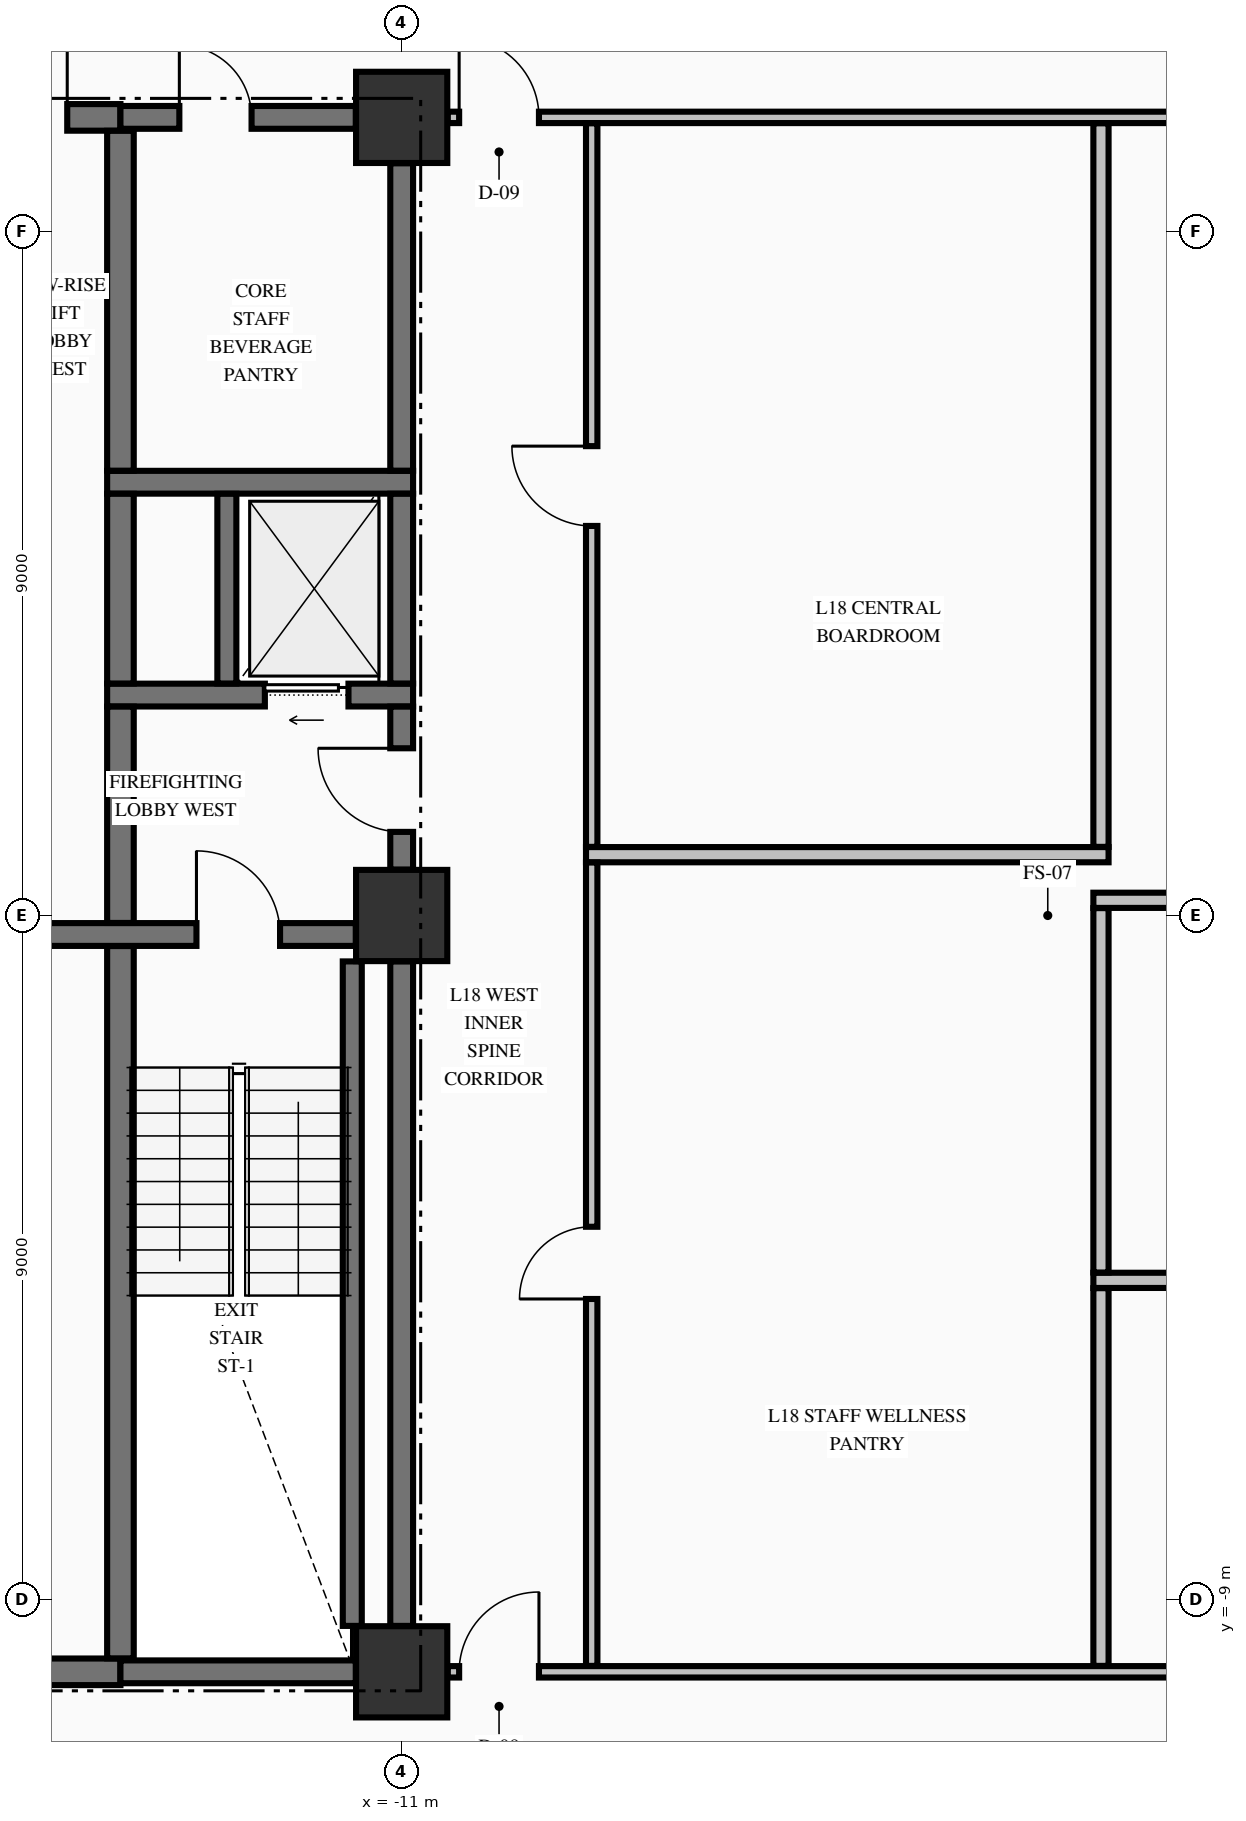
"""IFC4 building model, lengths in metres.
Left out: names, types, materials, properties, quantities, classifications, styles, units other than length and angle.
Written with IfcOpenShell. Run it as: python <this file> out.ifc"""

import sys

from ifc_helpers import new_model, si_unit, direction, frame, frame_2d, origin, origin_2d, place, context, subcontext, project, spatial, rectangle, extrude, element, fill, save


model = new_model("IFC4")
c1 = context("Model", 3, precision=1e-05, world=origin(), true_north=direction((0.0, 1.0)))
c2 = subcontext(c1, "Body", "Model", "MODEL_VIEW")
j1 = project(units=[si_unit("LENGTHUNIT", "METRE"), si_unit("PLANEANGLEUNIT", "RADIAN")], contexts=[c1])
p1 = place(None, origin())
s1 = spatial("IfcSite", under=j1, at=p1, CompositionType="ELEMENT")
p2 = place(p1, origin())
s2 = spatial("IfcBuilding", under=s1, at=p2, CompositionType="ELEMENT")
p3 = place(p2, frame((0.0, 0.0, 75.04)))
s3 = spatial("IfcBuildingStorey", under=s2, at=p3, CompositionType="ELEMENT", Elevation=75.04)
for number, where, z_axis, x_axis in (
    (1, (-11.0, -9.95, -0.25), (0.0, 0.0, 1.0), (1.0, 0.0, 0.0)),
    (2, (-11.0, 0.0, -0.25), (0.0, 0.0, 1.0), (1.0, 0.0, 0.0)),
    (3, (-11.0, 10.5, -0.25), (0.0, 0.0, 1.0), (1.0, 0.0, 0.0)),
):
    element("IfcColumn", number, at=place(p3, frame(where, z_axis=z_axis, x_axis=x_axis)), inside=s3, PredefinedType="COLUMN", context=c2, shape_type="SweptSolid", body=[
        extrude(rectangle(XDim=1.2, YDim=1.2, at=origin_2d()), origin(), (0.0, 0.0, 1.0), 3.57),
    ])
p4 = place(p3, frame((-19.396, -9.95, 0.0), z_axis=(0.0, 0.0, 1.0), x_axis=(1.0, 0.0, 0.0)))
e4 = element("IfcWall", 4, at=p4, inside=s3, PredefinedType="SHEAR", context=c2, shape_type="SweptSolid", body=[
    extrude(rectangle(XDim=4.696, YDim=0.35, at=frame_2d((2.348, 0.0))), origin(), (0.0, 0.0, 1.0), 3.32),
])
p5 = place(p4, frame((0.571, 0.0, 0.0)))
e5 = element("IfcOpeningElement", 5, at=p5, cuts=e4, PredefinedType="OPENING", context=c2, shape_type="SweptSolid", body=[
    extrude(rectangle(XDim=1.05, YDim=2.15, at=frame_2d((0.525, 1.075))), frame((0.0, 0.185, 0.0), z_axis=(0.0, -1.0, 0.0), x_axis=(1.0, 0.0, 0.0)), (0.0, 0.0, 1.0), 0.37),
])
p6 = place(p3, frame((-14.7, -9.95, 0.0), z_axis=(0.0, 0.0, 1.0), x_axis=(1.0, 0.0, 0.0)))
e6 = element("IfcWall", 6, at=p6, inside=s3, PredefinedType="SHEAR", context=c2, shape_type="SweptSolid", body=[
    extrude(rectangle(XDim=3.096, YDim=0.3, at=frame_2d((1.548, 0.0))), origin(), (0.0, 0.0, 1.0), 3.32),
])
p7 = place(p3, frame((-19.396, -0.25, 0.0), z_axis=(0.0, 0.0, 1.0), x_axis=(1.0, 0.0, 0.0)))
e7 = element("IfcWall", 7, at=p7, inside=s3, PredefinedType="SHEAR", context=c2, shape_type="SweptSolid", body=[
    extrude(rectangle(XDim=7.792, YDim=0.3, at=frame_2d((3.896, 0.0))), origin(), (0.0, 0.0, 1.0), 3.32),
])
p8 = place(p7, frame((5.696, 0.0, 0.0)))
e8 = element("IfcOpeningElement", 8, at=p8, cuts=e7, PredefinedType="OPENING", context=c2, shape_type="SweptSolid", body=[
    extrude(rectangle(XDim=1.1, YDim=2.15, at=frame_2d((0.55, 1.075))), frame((0.0, 0.16, 0.0), z_axis=(0.0, -1.0, 0.0), x_axis=(1.0, 0.0, 0.0)), (0.0, 0.0, 1.0), 0.32),
])
p9 = place(p3, frame((-14.875, 2.9, 0.0), z_axis=(0.0, 0.0, 1.0), x_axis=(1.0, 0.0, 0.0)))
e9 = element("IfcWall", 9, at=p9, inside=s3, PredefinedType="SHEAR", context=c2, shape_type="SweptSolid", body=[
    extrude(rectangle(XDim=4.025, YDim=0.3, at=frame_2d((2.012, 0.0))), origin(), (0.0, 0.0, 1.0), 3.32),
])
p10 = place(p9, frame((2.075, 0.0, 0.0)))
e10 = element("IfcOpeningElement", 10, at=p10, cuts=e9, PredefinedType="OPENING", context=c2, shape_type="SweptSolid", body=[
    extrude(rectangle(XDim=1.1, YDim=2.2, at=frame_2d((0.55, 1.1))), frame((0.0, 0.16, 0.0), z_axis=(0.0, -1.0, 0.0), x_axis=(1.0, 0.0, 0.0)), (0.0, 0.0, 1.0), 0.32),
])
p11 = place(p3, frame((-14.875, 5.7, 0.0), z_axis=(0.0, 0.0, 1.0), x_axis=(1.0, 0.0, 0.0)))
e11 = element("IfcWall", 11, at=p11, inside=s3, PredefinedType="SHEAR", context=c2, shape_type="SweptSolid", body=[
    extrude(rectangle(XDim=4.025, YDim=0.3, at=frame_2d((2.012, 0.0))), origin(), (0.0, 0.0, 1.0), 3.32),
])
p12 = place(p3, frame((-19.396, 10.5, 0.0), z_axis=(0.0, 0.0, 1.0), x_axis=(1.0, 0.0, 0.0)))
e12 = element("IfcWall", 12, at=p12, inside=s3, PredefinedType="SHEAR", context=c2, shape_type="SweptSolid", body=[
    extrude(rectangle(XDim=4.696, YDim=0.35, at=frame_2d((2.348, 0.0))), origin(), (0.0, 0.0, 1.0), 3.32),
])
p13 = place(p12, frame((2.796, 0.0, 0.0)))
e13 = element("IfcOpeningElement", 13, at=p13, cuts=e12, PredefinedType="OPENING", context=c2, shape_type="SweptSolid", body=[
    extrude(rectangle(XDim=1.2, YDim=2.15, at=frame_2d((0.6, 1.075))), frame((0.0, 0.185, 0.0), z_axis=(0.0, -1.0, 0.0), x_axis=(1.0, 0.0, 0.0)), (0.0, 0.0, 1.0), 0.37),
])
p14 = place(p3, frame((-14.7, 10.5, 0.0), z_axis=(0.0, 0.0, 1.0), x_axis=(1.0, 0.0, 0.0)))
e14 = element("IfcWall", 14, at=p14, inside=s3, PredefinedType="SHEAR", context=c2, shape_type="SweptSolid", body=[
    extrude(rectangle(XDim=3.096, YDim=0.3, at=frame_2d((1.548, 0.0))), origin(), (0.0, 0.0, 1.0), 3.32),
])
p15 = place(p14, frame((0.775, 0.0, 0.0)))
e15 = element("IfcOpeningElement", 15, at=p15, cuts=e14, PredefinedType="OPENING", context=c2, shape_type="SweptSolid", body=[
    extrude(rectangle(XDim=0.95, YDim=2.15, at=frame_2d((0.475, 1.075))), frame((0.0, 0.16, 0.0), z_axis=(0.0, -1.0, 0.0), x_axis=(1.0, 0.0, 0.0)), (0.0, 0.0, 1.0), 0.32),
])
p16 = place(p3, frame((-10.394, -9.95, 0.0), z_axis=(0.0, 0.0, 1.0), x_axis=(1.0, 0.0, 0.0)))
e16 = element("IfcWall", 16, at=p16, inside=s3, PredefinedType="PARTITIONING", context=c2, shape_type="SweptSolid", body=[
    extrude(rectangle(XDim=20.788, YDim=0.15, at=frame_2d((10.394, 0.0))), origin(), (0.0, 0.0, 1.0), 3.32),
])
p17 = place(p16, frame((0.15, 0.0, 0.0)))
e17 = element("IfcOpeningElement", 17, at=p17, cuts=e16, PredefinedType="OPENING", context=c2, shape_type="SweptSolid", body=[
    extrude(rectangle(XDim=1.05, YDim=2.15, at=frame_2d((0.525, 1.075))), frame((0.0, 0.085, 0.0), z_axis=(0.0, -1.0, 0.0), x_axis=(1.0, 0.0, 0.0)), (0.0, 0.0, 1.0), 0.17),
])
p18 = place(p16, frame((19.588, 0.0, 0.0)))
e18 = element("IfcOpeningElement", 18, at=p18, cuts=e16, PredefinedType="OPENING", context=c2, shape_type="SweptSolid", body=[
    extrude(rectangle(XDim=1.05, YDim=2.15, at=frame_2d((0.525, 1.075))), frame((0.0, 0.085, 0.0), z_axis=(0.0, -1.0, 0.0), x_axis=(1.0, 0.0, 0.0)), (0.0, 0.0, 1.0), 0.17),
])
p19 = place(p16, frame((11.769, 0.0, 0.0)))
e19 = element("IfcOpeningElement", 19, at=p19, cuts=e16, PredefinedType="OPENING", context=c2, shape_type="SweptSolid", body=[
    extrude(rectangle(XDim=0.95, YDim=2.15, at=frame_2d((0.475, 1.075))), frame((0.0, 0.085, 0.0), z_axis=(0.0, -1.0, 0.0), x_axis=(1.0, 0.0, 0.0)), (0.0, 0.0, 1.0), 0.17),
])
for number, where, z_axis, x_axis in (
    (20, (-1.9, -4.8, 0.0), (0.0, 0.0, 1.0), (1.0, 0.0, 0.0)),
    (21, (-1.9, 0.2, 0.0), (0.0, 0.0, 1.0), (1.0, 0.0, 0.0)),
):
    element("IfcWall", number, at=place(p3, frame(where, z_axis=z_axis, x_axis=x_axis)), inside=s3, PredefinedType="PARTITIONING", context=c2, shape_type="SweptSolid", body=[
        extrude(rectangle(XDim=10.475, YDim=0.2, at=frame_2d((5.237, 0.0))), origin(), (0.0, 0.0, 1.0), 3.32),
    ])
p20 = place(p3, frame((-8.575, 0.8, 0.0), z_axis=(0.0, 0.0, 1.0), x_axis=(1.0, 0.0, 0.0)))
e22 = element("IfcWall", 22, at=p20, inside=s3, PredefinedType="PARTITIONING", context=c2, shape_type="SweptSolid", body=[
    extrude(rectangle(XDim=6.875, YDim=0.2, at=frame_2d((3.438, 0.0))), origin(), (0.0, 0.0, 1.0), 3.32),
])
p21 = place(p3, frame((-10.394, 10.5, 0.0), z_axis=(0.0, 0.0, 1.0), x_axis=(1.0, 0.0, 0.0)))
e23 = element("IfcWall", 23, at=p21, inside=s3, PredefinedType="PARTITIONING", context=c2, shape_type="SweptSolid", body=[
    extrude(rectangle(XDim=20.788, YDim=0.15, at=frame_2d((10.394, 0.0))), origin(), (0.0, 0.0, 1.0), 3.32),
])
p22 = place(p21, frame((0.15, 0.0, 0.0)))
e24 = element("IfcOpeningElement", 24, at=p22, cuts=e23, PredefinedType="OPENING", context=c2, shape_type="SweptSolid", body=[
    extrude(rectangle(XDim=1.05, YDim=2.15, at=frame_2d((0.525, 1.075))), frame((0.0, 0.085, 0.0), z_axis=(0.0, -1.0, 0.0), x_axis=(1.0, 0.0, 0.0)), (0.0, 0.0, 1.0), 0.17),
])
p23 = place(p21, frame((19.588, 0.0, 0.0)))
e25 = element("IfcOpeningElement", 25, at=p23, cuts=e23, PredefinedType="OPENING", context=c2, shape_type="SweptSolid", body=[
    extrude(rectangle(XDim=1.05, YDim=2.15, at=frame_2d((0.525, 1.075))), frame((0.0, 0.085, 0.0), z_axis=(0.0, -1.0, 0.0), x_axis=(1.0, 0.0, 0.0)), (0.0, 0.0, 1.0), 0.17),
])
p24 = place(p3, frame((-14.7, -9.773, 0.0), z_axis=(0.0, 0.0, 1.0), x_axis=(0.0, 1.0, 0.0)))
e26 = element("IfcWall", 26, at=p24, inside=s3, PredefinedType="SHEAR", context=c2, shape_type="SweptSolid", body=[
    extrude(rectangle(XDim=9.371, YDim=0.35, at=frame_2d((4.686, 0.0))), origin(), (0.0, 0.0, 1.0), 3.32),
])
p25 = place(p3, frame((-14.7, -0.098, 0.0), z_axis=(0.0, 0.0, 1.0), x_axis=(0.0, 1.0, 0.0)))
e27 = element("IfcWall", 27, at=p25, inside=s3, PredefinedType="SHEAR", context=c2, shape_type="SweptSolid", body=[
    extrude(rectangle(XDim=2.846, YDim=0.35, at=frame_2d((1.423, 0.0))), origin(), (0.0, 0.0, 1.0), 3.32),
])
p26 = place(p3, frame((-14.7, 3.052, 0.0), z_axis=(0.0, 0.0, 1.0), x_axis=(0.0, 1.0, 0.0)))
e28 = element("IfcWall", 28, at=p26, inside=s3, PredefinedType="SHEAR", context=c2, shape_type="SweptSolid", body=[
    extrude(rectangle(XDim=2.496, YDim=0.35, at=frame_2d((1.248, 0.0))), origin(), (0.0, 0.0, 1.0), 3.32),
])
p27 = place(p3, frame((-14.7, 5.852, 0.0), z_axis=(0.0, 0.0, 1.0), x_axis=(0.0, 1.0, 0.0)))
e29 = element("IfcWall", 29, at=p27, inside=s3, PredefinedType="SHEAR", context=c2, shape_type="SweptSolid", body=[
    extrude(rectangle(XDim=4.471, YDim=0.35, at=frame_2d((2.235, 0.0))), origin(), (0.0, 0.0, 1.0), 3.32),
])
p28 = place(p3, frame((-13.3, 3.052, 0.0), z_axis=(0.0, 0.0, 1.0), x_axis=(0.0, 1.0, 0.0)))
e30 = element("IfcWall", 30, at=p28, inside=s3, PredefinedType="SOLIDWALL", context=c2, shape_type="SweptSolid", body=[
    extrude(rectangle(XDim=2.496, YDim=0.25, at=frame_2d((1.248, 0.0))), origin(), (0.0, 0.0, 1.0), 3.32),
])
p29 = place(p3, frame((-11.65, -9.346, 0.0), z_axis=(0.0, 0.0, 1.0), x_axis=(0.0, 1.0, 0.0)))
e31 = element("IfcWall", 31, at=p29, inside=s3, PredefinedType="SOLIDWALL", context=c2, shape_type="SweptSolid", body=[
    extrude(rectangle(XDim=8.742, YDim=0.25, at=frame_2d((4.371, 0.0))), origin(), (0.0, 0.0, 1.0), 3.32),
])
p30 = place(p3, frame((-11.0, -9.346, 0.0), z_axis=(0.0, 0.0, 1.0), x_axis=(0.0, 1.0, 0.0)))
e32 = element("IfcWall", 32, at=p30, inside=s3, PredefinedType="SHEAR", context=c2, shape_type="SweptSolid", body=[
    extrude(rectangle(XDim=8.742, YDim=0.3, at=frame_2d((4.371, 0.0))), origin(), (0.0, 0.0, 1.0), 3.32),
])
p31 = place(p3, frame((-11.0, 0.604, 0.0), z_axis=(0.0, 0.0, 1.0), x_axis=(0.0, 1.0, 0.0)))
e33 = element("IfcWall", 33, at=p31, inside=s3, PredefinedType="SHEAR", context=c2, shape_type="SweptSolid", body=[
    extrude(rectangle(XDim=2.144, YDim=0.3, at=frame_2d((1.072, 0.0))), origin(), (0.0, 0.0, 1.0), 3.32),
])
p32 = place(p31, frame((0.496, 0.0, 0.0)))
e34 = element("IfcOpeningElement", 34, at=p32, cuts=e33, PredefinedType="OPENING", context=c2, shape_type="SweptSolid", body=[
    extrude(rectangle(XDim=1.1, YDim=2.15, at=frame_2d((0.55, 1.075))), frame((0.0, 0.16, 0.0), z_axis=(0.0, -1.0, 0.0), x_axis=(1.0, 0.0, 0.0)), (0.0, 0.0, 1.0), 0.32),
])
p33 = place(p3, frame((-11.0, 3.052, 0.0), z_axis=(0.0, 0.0, 1.0), x_axis=(0.0, 1.0, 0.0)))
e35 = element("IfcWall", 35, at=p33, inside=s3, PredefinedType="SHEAR", context=c2, shape_type="SweptSolid", body=[
    extrude(rectangle(XDim=2.496, YDim=0.3, at=frame_2d((1.248, 0.0))), origin(), (0.0, 0.0, 1.0), 3.32),
])
p34 = place(p3, frame((-11.0, 5.852, 0.0), z_axis=(0.0, 0.0, 1.0), x_axis=(0.0, 1.0, 0.0)))
e36 = element("IfcWall", 36, at=p34, inside=s3, PredefinedType="SHEAR", context=c2, shape_type="SweptSolid", body=[
    extrude(rectangle(XDim=4.044, YDim=0.3, at=frame_2d((2.022, 0.0))), origin(), (0.0, 0.0, 1.0), 3.32),
])
p35 = place(p3, frame((-8.5, -9.872, 0.0), z_axis=(0.0, 0.0, 1.0), x_axis=(0.0, 1.0, 0.0)))
e37 = element("IfcWall", 37, at=p35, inside=s3, PredefinedType="PARTITIONING", context=c2, shape_type="SweptSolid", body=[
    extrude(rectangle(XDim=10.569, YDim=0.15, at=frame_2d((5.285, 0.0))), origin(), (0.0, 0.0, 1.0), 3.32),
])
p36 = place(p35, frame((4.827, 0.0, 0.0)))
e38 = element("IfcOpeningElement", 38, at=p36, cuts=e37, PredefinedType="OPENING", context=c2, shape_type="SweptSolid", body=[
    extrude(rectangle(XDim=0.95, YDim=2.15, at=frame_2d((0.475, 1.075))), frame((0.0, 0.085, 0.0), z_axis=(0.0, -1.0, 0.0), x_axis=(1.0, 0.0, 0.0)), (0.0, 0.0, 1.0), 0.17),
])
p37 = place(p3, frame((-8.5, 0.903, 0.0), z_axis=(0.0, 0.0, 1.0), x_axis=(0.0, 1.0, 0.0)))
e39 = element("IfcWall", 39, at=p37, inside=s3, PredefinedType="PARTITIONING", context=c2, shape_type="SweptSolid", body=[
    extrude(rectangle(XDim=9.519, YDim=0.15, at=frame_2d((4.76, 0.0))), origin(), (0.0, 0.0, 1.0), 3.32),
])
p38 = place(p37, frame((4.222, 0.0, 0.0)))
e40 = element("IfcOpeningElement", 40, at=p38, cuts=e39, PredefinedType="OPENING", context=c2, shape_type="SweptSolid", body=[
    extrude(rectangle(XDim=1.05, YDim=2.15, at=frame_2d((0.525, 1.075))), frame((0.0, 0.085, 0.0), z_axis=(0.0, -1.0, 0.0), x_axis=(1.0, 0.0, 0.0)), (0.0, 0.0, 1.0), 0.17),
])
p39 = place(p3, frame((-1.8, -9.872, 0.0), z_axis=(0.0, 0.0, 1.0), x_axis=(0.0, 1.0, 0.0)))
e41 = element("IfcWall", 41, at=p39, inside=s3, PredefinedType="PARTITIONING", context=c2, shape_type="SweptSolid", body=[
    extrude(rectangle(XDim=4.969, YDim=0.2, at=frame_2d((2.484, 0.0))), origin(), (0.0, 0.0, 1.0), 3.32),
])
p40 = place(p3, frame((-1.8, -4.697, 0.0), z_axis=(0.0, 0.0, 1.0), x_axis=(0.0, 1.0, 0.0)))
e42 = element("IfcWall", 42, at=p40, inside=s3, PredefinedType="PARTITIONING", context=c2, shape_type="SweptSolid", body=[
    extrude(rectangle(XDim=4.794, YDim=0.2, at=frame_2d((2.397, 0.0))), origin(), (0.0, 0.0, 1.0), 3.32),
])
p41 = place(p3, frame((-1.8, 0.903, 0.0), z_axis=(0.0, 0.0, 1.0), x_axis=(0.0, 1.0, 0.0)))
e43 = element("IfcWall", 43, at=p41, inside=s3, PredefinedType="PARTITIONING", context=c2, shape_type="SweptSolid", body=[
    extrude(rectangle(XDim=9.519, YDim=0.2, at=frame_2d((4.76, 0.0))), origin(), (0.0, 0.0, 1.0), 3.32),
])
p42 = place(p8, origin())
e44 = element("IfcDoor", 44, at=p42, inside=s3, OperationType="SINGLE_SWING_LEFT", PredefinedType="DOOR", context=c2, shape_type="SweptSolid", body=[
    extrude(rectangle(XDim=1.1, YDim=2.15, at=frame_2d((0.55, 1.075))), frame((0.0, 0.025, 0.0), z_axis=(0.0, -1.0, 0.0), x_axis=(1.0, 0.0, 0.0)), (0.0, 0.0, 1.0), 0.05),
])
fill(e8, e44)
p43 = place(p32, origin())
e45 = element("IfcDoor", 45, at=p43, inside=s3, OperationType="SINGLE_SWING_RIGHT", PredefinedType="DOOR", context=c2, shape_type="SweptSolid", body=[
    extrude(rectangle(XDim=1.1, YDim=2.15, at=frame_2d((0.55, 1.075))), frame((0.0, 0.025, 0.0), z_axis=(0.0, -1.0, 0.0), x_axis=(1.0, 0.0, 0.0)), (0.0, 0.0, 1.0), 0.05),
])
fill(e34, e45)
p44 = place(p10, origin())
e46 = element("IfcDoor", 46, at=p44, inside=s3, OperationType="SLIDING_TO_LEFT", PredefinedType="DOOR", context=c2, shape_type="SweptSolid", body=[
    extrude(rectangle(XDim=1.1, YDim=2.2, at=frame_2d((0.55, 1.1))), frame((0.0, 0.025, 0.0), z_axis=(0.0, -1.0, 0.0), x_axis=(1.0, 0.0, 0.0)), (0.0, 0.0, 1.0), 0.05),
])
fill(e10, e46)
p45 = place(p15, origin())
e47 = element("IfcDoor", 47, at=p45, inside=s3, OperationType="SINGLE_SWING_LEFT", PredefinedType="DOOR", context=c2, shape_type="SweptSolid", body=[
    extrude(rectangle(XDim=0.95, YDim=2.15, at=frame_2d((0.475, 1.075))), frame((0.0, 0.025, 0.0), z_axis=(0.0, -1.0, 0.0), x_axis=(1.0, 0.0, 0.0)), (0.0, 0.0, 1.0), 0.05),
])
fill(e15, e47)
p46 = place(p13, origin())
e48 = element("IfcDoor", 48, at=p46, inside=s3, OperationType="SINGLE_SWING_RIGHT", PredefinedType="DOOR", context=c2, shape_type="SweptSolid", body=[
    extrude(rectangle(XDim=1.2, YDim=2.15, at=frame_2d((0.6, 1.075))), frame((0.0, 0.025, 0.0), z_axis=(0.0, -1.0, 0.0), x_axis=(1.0, 0.0, 0.0)), (0.0, 0.0, 1.0), 0.05),
])
fill(e13, e48)
p47 = place(p22, origin())
e49 = element("IfcDoor", 49, at=p47, inside=s3, OperationType="SINGLE_SWING_LEFT", PredefinedType="DOOR", context=c2, shape_type="SweptSolid", body=[
    extrude(rectangle(XDim=1.05, YDim=2.15, at=frame_2d((0.525, 1.075))), frame((0.0, 0.025, 0.0), z_axis=(0.0, -1.0, 0.0), x_axis=(1.0, 0.0, 0.0)), (0.0, 0.0, 1.0), 0.05),
])
fill(e24, e49)
p48 = place(p17, origin())
e50 = element("IfcDoor", 50, at=p48, inside=s3, OperationType="SINGLE_SWING_RIGHT", PredefinedType="DOOR", context=c2, shape_type="SweptSolid", body=[
    extrude(rectangle(XDim=1.05, YDim=2.15, at=frame_2d((0.525, 1.075))), frame((0.0, 0.025, 0.0), z_axis=(0.0, -1.0, 0.0), x_axis=(1.0, 0.0, 0.0)), (0.0, 0.0, 1.0), 0.05),
])
fill(e17, e50)
p49 = place(p38, origin())
e51 = element("IfcDoor", 51, at=p49, inside=s3, OperationType="SINGLE_SWING_RIGHT", PredefinedType="DOOR", context=c2, shape_type="SweptSolid", body=[
    extrude(rectangle(XDim=1.05, YDim=2.15, at=frame_2d((0.525, 1.075))), frame((0.0, 0.025, 0.0), z_axis=(0.0, -1.0, 0.0), x_axis=(1.0, 0.0, 0.0)), (0.0, 0.0, 1.0), 0.05),
])
fill(e40, e51)
p50 = place(p36, origin())
e52 = element("IfcDoor", 52, at=p50, inside=s3, OperationType="SINGLE_SWING_LEFT", PredefinedType="DOOR", context=c2, shape_type="SweptSolid", body=[
    extrude(rectangle(XDim=0.95, YDim=2.15, at=frame_2d((0.475, 1.075))), frame((0.0, 0.025, 0.0), z_axis=(0.0, -1.0, 0.0), x_axis=(1.0, 0.0, 0.0)), (0.0, 0.0, 1.0), 0.05),
])
fill(e38, e52)
save(model, sys.argv[1])
